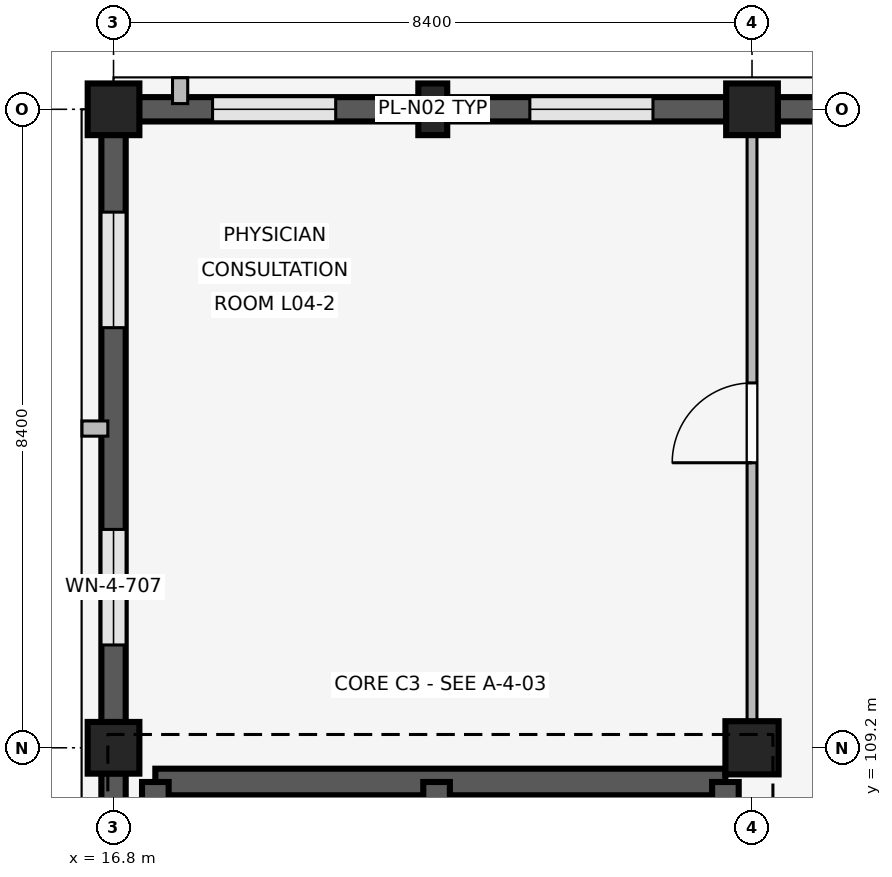
"""IFC4 building model, lengths in metres.
Left out: names, types, materials, properties, quantities, classifications, styles, units other than length and angle.
Written with IfcOpenShell. Run it as: python <this file> out.ifc"""

import sys

from ifc_helpers import new_model, si_unit, direction, frame, frame_2d, origin, origin_2d, place, context, subcontext, project, spatial, rectangle, extrude, element, fill, save


model = new_model("IFC4")
c1 = context("Model", 3, precision=1e-05, world=origin(), true_north=direction((0.0, 1.0)))
c2 = subcontext(c1, "Body", "Model", "MODEL_VIEW")
j1 = project(units=[si_unit("LENGTHUNIT", "METRE"), si_unit("PLANEANGLEUNIT", "RADIAN")], contexts=[c1])
p1 = place(None, origin())
s1 = spatial("IfcSite", under=j1, at=p1, CompositionType="ELEMENT")
p2 = place(p1, origin())
s2 = spatial("IfcBuilding", under=s1, at=p2, CompositionType="ELEMENT")
p3 = place(p2, frame((0.0, 0.0, 16.2)))
s3 = spatial("IfcBuildingStorey", under=s2, at=p3, CompositionType="ELEMENT", Elevation=16.2)
for number, where, z_axis, x_axis in (
    (1, (16.8, 109.2, 0.0), (0.0, 0.0, 1.0), (1.0, 0.0, 0.0)),
    (2, (16.8, 117.6, 0.0), (0.0, 0.0, 1.0), (1.0, 0.0, 0.0)),
):
    element("IfcColumn", number, at=place(p3, frame(where, z_axis=z_axis, x_axis=x_axis)), inside=s3, PredefinedType="COLUMN", context=c2, shape_type="SweptSolid", body=[
        extrude(rectangle(XDim=0.68, YDim=0.68, at=origin_2d()), origin(), (0.0, 0.0, 1.0), 4.2),
    ])
p4 = place(p3, frame((25.2, 109.2, 0.0), z_axis=(0.0, 0.0, 1.0), x_axis=(1.0, 0.0, 0.0)))
e3 = element("IfcColumn", 3, at=p4, inside=s3, PredefinedType="COLUMN", context=c2, shape_type="SweptSolid", body=[
    extrude(rectangle(XDim=0.7, YDim=0.7, at=origin_2d()), origin(), (0.0, 0.0, 1.0), 4.2),
])
p5 = place(p3, frame((25.2, 117.6, 0.0), z_axis=(0.0, 0.0, 1.0), x_axis=(1.0, 0.0, 0.0)))
e4 = element("IfcColumn", 4, at=p5, inside=s3, PredefinedType="COLUMN", context=c2, shape_type="SweptSolid", body=[
    extrude(rectangle(XDim=0.68, YDim=0.68, at=origin_2d()), origin(), (0.0, 0.0, 1.0), 4.2),
])
p6 = place(p3, frame((21.0, 117.6, 0.0), z_axis=(0.0, 0.0, 1.0), x_axis=(1.0, 0.0, 0.0)))
e5 = element("IfcColumn", 5, at=p6, inside=s3, PredefinedType="PILASTER", context=c2, shape_type="SweptSolid", body=[
    extrude(rectangle(XDim=0.38, YDim=0.68, at=origin_2d()), origin(), (0.0, 0.0, 1.0), 4.2),
])
p7 = place(p3, frame((16.8, 101.135, 0.0), z_axis=(0.0, 0.0, 1.0), x_axis=(0.0, 1.0, 0.0)))
e6 = element("IfcWall", 6, at=p7, inside=s3, PredefinedType="SOLIDWALL", context=c2, shape_type="SweptSolid", body=[
    extrude(rectangle(XDim=7.73, YDim=0.32, at=frame_2d((3.865, 0.0))), origin(), (0.0, 0.0, 1.0), 3.32),
])
p8 = place(p7, frame((0.978, 0.0, 0.85)))
e7 = element("IfcOpeningElement", 7, at=p8, cuts=e6, PredefinedType="OPENING", context=c2, shape_type="SweptSolid", body=[
    extrude(rectangle(XDim=1.6, YDim=1.65, at=frame_2d((0.8, 0.825))), frame((0.0, 0.17, 0.0), z_axis=(0.0, -1.0, 0.0), x_axis=(1.0, 0.0, 0.0)), (0.0, 0.0, 1.0), 0.34),
])
p9 = place(p7, frame((5.152, 0.0, 0.85)))
e8 = element("IfcOpeningElement", 8, at=p9, cuts=e6, PredefinedType="OPENING", context=c2, shape_type="SweptSolid", body=[
    extrude(rectangle(XDim=1.6, YDim=1.65, at=frame_2d((0.8, 0.825))), frame((0.0, 0.17, 0.0), z_axis=(0.0, -1.0, 0.0), x_axis=(1.0, 0.0, 0.0)), (0.0, 0.0, 1.0), 0.34),
])
p10 = place(p3, frame((17.135, 117.6, 0.0), z_axis=(0.0, 0.0, 1.0), x_axis=(1.0, 0.0, 0.0)))
e9 = element("IfcWall", 9, at=p10, inside=s3, PredefinedType="SOLIDWALL", context=c2, shape_type="SweptSolid", body=[
    extrude(rectangle(XDim=7.73, YDim=0.32, at=frame_2d((3.865, 0.0))), origin(), (0.0, 0.0, 1.0), 3.32),
])
p11 = place(p10, frame((0.968, 0.0, 0.85)))
e10 = element("IfcOpeningElement", 10, at=p11, cuts=e9, PredefinedType="OPENING", context=c2, shape_type="SweptSolid", body=[
    extrude(rectangle(XDim=1.62, YDim=1.52, at=frame_2d((0.81, 0.76))), frame((0.0, 0.17, 0.0), z_axis=(0.0, -1.0, 0.0), x_axis=(1.0, 0.0, 0.0)), (0.0, 0.0, 1.0), 0.34),
])
p12 = place(p10, frame((5.142, 0.0, 0.85)))
e11 = element("IfcOpeningElement", 11, at=p12, cuts=e9, PredefinedType="OPENING", context=c2, shape_type="SweptSolid", body=[
    extrude(rectangle(XDim=1.62, YDim=1.52, at=frame_2d((0.81, 0.76))), frame((0.0, 0.17, 0.0), z_axis=(0.0, -1.0, 0.0), x_axis=(1.0, 0.0, 0.0)), (0.0, 0.0, 1.0), 0.34),
])
p13 = place(p3, frame((17.676, 117.675, 0.0), z_axis=(0.0, 0.0, 1.0), x_axis=(0.0, 1.0, 0.0)))
e12 = element("IfcWall", 12, at=p13, inside=s3, PredefinedType="ELEMENTEDWALL", context=c2, shape_type="SweptSolid", body=[
    extrude(rectangle(XDim=0.34, YDim=0.2, at=frame_2d((0.17, 0.0))), origin(), (0.0, 0.0, 1.0), 3.3),
])
p14 = place(p3, frame((16.8, 109.535, 0.0), z_axis=(0.0, 0.0, 1.0), x_axis=(0.0, 1.0, 0.0)))
e13 = element("IfcWall", 13, at=p14, inside=s3, PredefinedType="SOLIDWALL", context=c2, shape_type="SweptSolid", body=[
    extrude(rectangle(XDim=7.73, YDim=0.32, at=frame_2d((3.865, 0.0))), origin(), (0.0, 0.0, 1.0), 3.32),
])
p15 = place(p14, frame((1.018, 0.0, 0.85)))
e14 = element("IfcOpeningElement", 14, at=p15, cuts=e13, PredefinedType="OPENING", context=c2, shape_type="SweptSolid", body=[
    extrude(rectangle(XDim=1.52, YDim=1.65, at=frame_2d((0.76, 0.825))), frame((0.0, 0.17, 0.0), z_axis=(0.0, -1.0, 0.0), x_axis=(1.0, 0.0, 0.0)), (0.0, 0.0, 1.0), 0.34),
])
p16 = place(p14, frame((5.192, 0.0, 0.85)))
e15 = element("IfcOpeningElement", 15, at=p16, cuts=e13, PredefinedType="OPENING", context=c2, shape_type="SweptSolid", body=[
    extrude(rectangle(XDim=1.52, YDim=1.65, at=frame_2d((0.76, 0.825))), frame((0.0, 0.17, 0.0), z_axis=(0.0, -1.0, 0.0), x_axis=(1.0, 0.0, 0.0)), (0.0, 0.0, 1.0), 0.34),
])
p17 = place(p3, frame((16.725, 113.4, 0.0), z_axis=(0.0, 0.0, 1.0), x_axis=(-1.0, 0.0, 0.0)))
e16 = element("IfcWall", 16, at=p17, inside=s3, PredefinedType="ELEMENTEDWALL", context=c2, shape_type="SweptSolid", body=[
    extrude(rectangle(XDim=0.34, YDim=0.2, at=frame_2d((0.17, 0.0))), origin(), (0.0, 0.0, 1.0), 3.3),
])
p18 = place(p3, frame((25.535, 117.6, 0.0), z_axis=(0.0, 0.0, 1.0), x_axis=(1.0, 0.0, 0.0)))
e17 = element("IfcWall", 17, at=p18, inside=s3, PredefinedType="SOLIDWALL", context=c2, shape_type="SweptSolid", body=[
    extrude(rectangle(XDim=7.73, YDim=0.32, at=frame_2d((3.865, 0.0))), origin(), (0.0, 0.0, 1.0), 3.32),
])
p19 = place(p18, frame((0.978, 0.0, 0.85)))
e18 = element("IfcOpeningElement", 18, at=p19, cuts=e17, PredefinedType="OPENING", context=c2, shape_type="SweptSolid", body=[
    extrude(rectangle(XDim=1.6, YDim=1.65, at=frame_2d((0.8, 0.825))), frame((0.0, 0.17, 0.0), z_axis=(0.0, -1.0, 0.0), x_axis=(1.0, 0.0, 0.0)), (0.0, 0.0, 1.0), 0.34),
])
p20 = place(p18, frame((5.152, 0.0, 0.85)))
e19 = element("IfcOpeningElement", 19, at=p20, cuts=e17, PredefinedType="OPENING", context=c2, shape_type="SweptSolid", body=[
    extrude(rectangle(XDim=1.6, YDim=1.65, at=frame_2d((0.8, 0.825))), frame((0.0, 0.17, 0.0), z_axis=(0.0, -1.0, 0.0), x_axis=(1.0, 0.0, 0.0)), (0.0, 0.0, 1.0), 0.34),
])
p21 = place(p3, frame((17.35, 108.75, 0.0), z_axis=(0.0, 0.0, 1.0), x_axis=(1.0, 0.0, 0.0)))
e20 = element("IfcWall", 20, at=p21, inside=s3, PredefinedType="SHEAR", context=c2, shape_type="SweptSolid", body=[
    extrude(rectangle(XDim=7.5, YDim=0.35, at=frame_2d((3.75, 0.0))), origin(), (0.0, 0.0, 1.0), 3.92),
])
p22 = place(p3, frame((17.35, 101.2, 0.0), z_axis=(0.0, 0.0, 1.0), x_axis=(0.0, 1.0, 0.0)))
e21 = element("IfcWall", 21, at=p22, inside=s3, PredefinedType="SHEAR", context=c2, shape_type="SweptSolid", body=[
    extrude(rectangle(XDim=7.55, YDim=0.35, at=frame_2d((3.775, 0.0))), origin(), (0.0, 0.0, 1.0), 3.92),
])
p23 = place(p3, frame((24.85, 101.2, 0.0), z_axis=(0.0, 0.0, 1.0), x_axis=(0.0, 1.0, 0.0)))
e22 = element("IfcWall", 22, at=p23, inside=s3, PredefinedType="SHEAR", context=c2, shape_type="SweptSolid", body=[
    extrude(rectangle(XDim=7.55, YDim=0.35, at=frame_2d((3.775, 0.0))), origin(), (0.0, 0.0, 1.0), 3.92),
])
p24 = place(p23, frame((2.4, 0.0, 0.0)))
e23 = element("IfcOpeningElement", 23, at=p24, cuts=e22, PredefinedType="OPENING", context=c2, shape_type="SweptSolid", body=[
    extrude(rectangle(XDim=1.2, YDim=2.2, at=frame_2d((0.6, 1.1))), frame((0.0, 0.185, 0.0), z_axis=(0.0, -1.0, 0.0), x_axis=(1.0, 0.0, 0.0)), (0.0, 0.0, 1.0), 0.37),
])
p25 = place(p3, frame((21.05, 101.2, 0.0), z_axis=(0.0, 0.0, 1.0), x_axis=(0.0, 1.0, 0.0)))
e24 = element("IfcWall", 24, at=p25, inside=s3, PredefinedType="SHEAR", context=c2, shape_type="SweptSolid", body=[
    extrude(rectangle(XDim=7.55, YDim=0.35, at=frame_2d((3.775, 0.0))), origin(), (0.0, 0.0, 1.0), 3.92),
])
p26 = place(p25, frame((0.28, 0.0, 0.0)))
e25 = element("IfcOpeningElement", 25, at=p26, cuts=e24, PredefinedType="OPENING", context=c2, shape_type="SweptSolid", body=[
    extrude(rectangle(XDim=1.0, YDim=2.15, at=frame_2d((0.5, 1.075))), frame((0.0, 0.185, 0.0), z_axis=(0.0, -1.0, 0.0), x_axis=(1.0, 0.0, 0.0)), (0.0, 0.0, 1.0), 0.37),
])
p27 = place(p3, frame((25.2, 109.55, 0.0), z_axis=(0.0, 0.0, 1.0), x_axis=(0.0, 1.0, 0.0)))
e26 = element("IfcWall", 26, at=p27, inside=s3, PredefinedType="PARTITIONING", context=c2, shape_type="SweptSolid", body=[
    extrude(rectangle(XDim=7.91, YDim=0.13, at=frame_2d((3.955, 0.0))), origin(), (0.0, 0.0, 1.0), 3.3),
])
p28 = place(p27, frame((3.4, 0.0, 0.0)))
e27 = element("IfcOpeningElement", 27, at=p28, cuts=e26, PredefinedType="OPENING", context=c2, shape_type="SweptSolid", body=[
    extrude(rectangle(XDim=1.05, YDim=2.2, at=frame_2d((0.525, 1.1))), frame((0.0, 0.075, 0.0), z_axis=(0.0, -1.0, 0.0), x_axis=(1.0, 0.0, 0.0)), (0.0, 0.0, 1.0), 0.15),
])
p29 = place(p11, origin())
e28 = element("IfcWindow", 28, at=p29, inside=s3, PartitioningType="SINGLE_PANEL", PredefinedType="WINDOW", context=c2, shape_type="SweptSolid", body=[
    extrude(rectangle(XDim=1.62, YDim=1.52, at=frame_2d((0.81, 0.76))), frame((0.0, 0.03, 0.0), z_axis=(0.0, -1.0, 0.0), x_axis=(1.0, 0.0, 0.0)), (0.0, 0.0, 1.0), 0.06),
])
fill(e10, e28)
p30 = place(p12, origin())
e29 = element("IfcWindow", 29, at=p30, inside=s3, PartitioningType="SINGLE_PANEL", PredefinedType="WINDOW", context=c2, shape_type="SweptSolid", body=[
    extrude(rectangle(XDim=1.62, YDim=1.52, at=frame_2d((0.81, 0.76))), frame((0.0, 0.03, 0.0), z_axis=(0.0, -1.0, 0.0), x_axis=(1.0, 0.0, 0.0)), (0.0, 0.0, 1.0), 0.06),
])
fill(e11, e29)
p31 = place(p15, origin())
e30 = element("IfcWindow", 30, at=p31, inside=s3, PartitioningType="SINGLE_PANEL", PredefinedType="WINDOW", context=c2, shape_type="SweptSolid", body=[
    extrude(rectangle(XDim=1.52, YDim=1.65, at=frame_2d((0.76, 0.825))), frame((0.0, 0.03, 0.0), z_axis=(0.0, -1.0, 0.0), x_axis=(1.0, 0.0, 0.0)), (0.0, 0.0, 1.0), 0.06),
])
fill(e14, e30)
p32 = place(p16, origin())
e31 = element("IfcWindow", 31, at=p32, inside=s3, PartitioningType="SINGLE_PANEL", PredefinedType="WINDOW", context=c2, shape_type="SweptSolid", body=[
    extrude(rectangle(XDim=1.52, YDim=1.65, at=frame_2d((0.76, 0.825))), frame((0.0, 0.03, 0.0), z_axis=(0.0, -1.0, 0.0), x_axis=(1.0, 0.0, 0.0)), (0.0, 0.0, 1.0), 0.06),
])
fill(e15, e31)
p33 = place(p28, origin())
e32 = element("IfcDoor", 32, at=p33, inside=s3, OperationType="SINGLE_SWING_LEFT", PredefinedType="DOOR", context=c2, shape_type="SweptSolid", body=[
    extrude(rectangle(XDim=1.05, YDim=2.2, at=frame_2d((0.525, 1.1))), frame((0.0, 0.025, 0.0), z_axis=(0.0, -1.0, 0.0), x_axis=(1.0, 0.0, 0.0)), (0.0, 0.0, 1.0), 0.05),
])
fill(e27, e32)
save(model, sys.argv[1])
